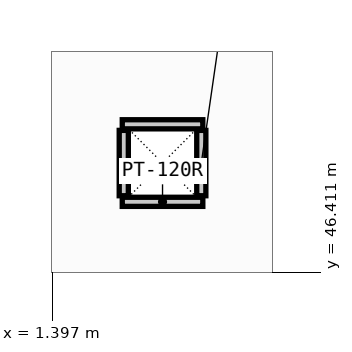
"""IFC4 building model, lengths in metres.
Left out: names, types, materials, properties, quantities, classifications, styles, units other than length and angle.
Written with IfcOpenShell. Run it as: python <this file> out.ifc"""

import sys

from ifc_helpers import new_model, si_unit, direction, frame, frame_2d, origin, place, context, subcontext, project, spatial, rectangle, extrude, element, save


model = new_model("IFC4")
c1 = context("Model", 3, precision=1e-05, world=origin(), true_north=direction((0.0, 1.0)))
c2 = subcontext(c1, "Body", "Model", "MODEL_VIEW")
j1 = project(units=[si_unit("LENGTHUNIT", "METRE"), si_unit("PLANEANGLEUNIT", "RADIAN")], contexts=[c1])
p1 = place(None, origin())
s1 = spatial("IfcSite", under=j1, at=p1, CompositionType="ELEMENT")
p2 = place(p1, origin())
s2 = spatial("IfcBuilding", under=s1, at=p2, CompositionType="ELEMENT")
p3 = place(p2, frame((0.0, 0.0, 9.0)))
s3 = spatial("IfcBuildingStorey", under=s2, at=p3, CompositionType="ELEMENT", Elevation=9.0)
for number, where, z_axis, x_axis in (
    (1, (2.32, 47.34, 0.0), (0.0, 0.0, 1.0), (1.0, 0.0, 0.0)),
    (2, (2.32, 48.36, 0.0), (0.0, 0.0, 1.0), (1.0, 0.0, 0.0)),
):
    element("IfcWall", number, at=place(p3, frame(where, z_axis=z_axis, x_axis=x_axis)), inside=s3, PredefinedType="PARTITIONING", context=c2, shape_type="SweptSolid", body=[
        extrude(rectangle(XDim=1.06, YDim=0.12, at=frame_2d((0.53, 0.0))), origin(), (0.0, 0.0, 1.0), 2.95),
    ])
for number, where, z_axis, x_axis in (
    (3, (2.34, 47.42, 0.0), (0.0, 0.0, 1.0), (0.0, 1.0, 0.0)),
    (4, (3.36, 47.42, 0.0), (0.0, 0.0, 1.0), (0.0, 1.0, 0.0)),
):
    element("IfcWall", number, at=place(p3, frame(where, z_axis=z_axis, x_axis=x_axis)), inside=s3, PredefinedType="PARTITIONING", context=c2, shape_type="SweptSolid", body=[
        extrude(rectangle(XDim=0.86, YDim=0.12, at=frame_2d((0.43, 0.0))), origin(), (0.0, 0.0, 1.0), 2.95),
    ])
save(model, sys.argv[1])
